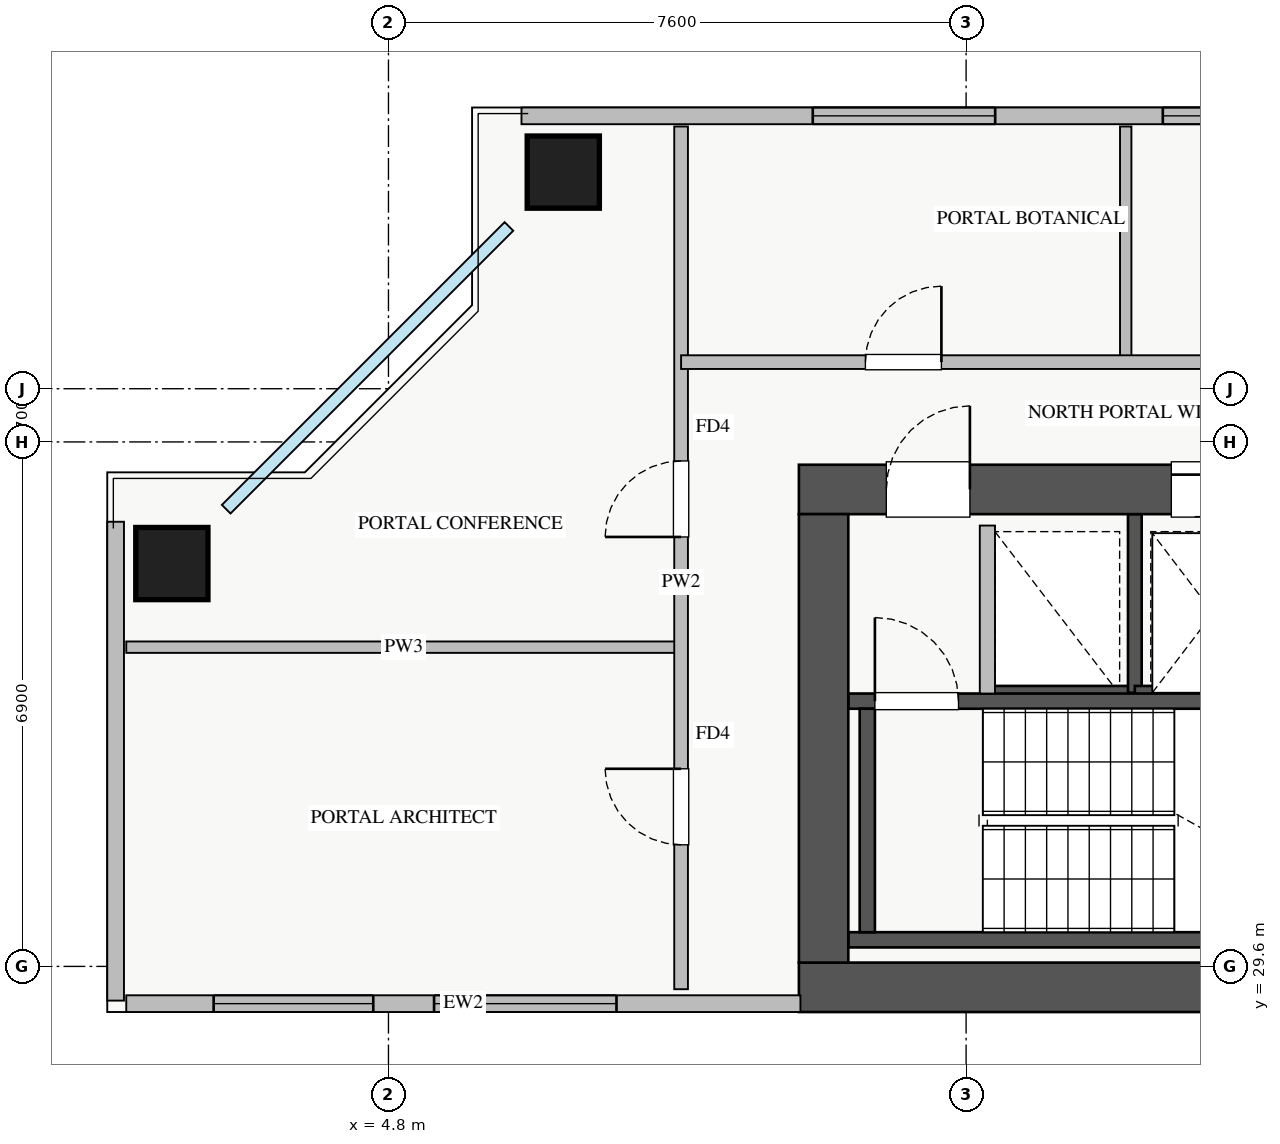
"""IFC4 building model, lengths in metres.
Left out: names, types, materials, properties, quantities, classifications, styles, units other than length and angle.
Written with IfcOpenShell. Run it as: python <this file> out.ifc"""

import sys

from ifc_helpers import new_model, si_unit, direction, frame, frame_2d, origin, origin_2d, place, context, subcontext, project, spatial, rectangle, extrude, source, transform, mapped, element, fill, save


model = new_model("IFC4")
c1 = context("Model", 3, precision=1e-05, world=origin(), true_north=direction((0.0, 1.0)))
c2 = subcontext(c1, "Body", "Model", "MODEL_VIEW")
j1 = project(units=[si_unit("LENGTHUNIT", "METRE"), si_unit("PLANEANGLEUNIT", "RADIAN")], contexts=[c1])
p1 = place(None, origin())
s1 = spatial("IfcSite", under=j1, at=p1, CompositionType="ELEMENT")
p2 = place(p1, origin())
s2 = spatial("IfcBuilding", under=s1, at=p2, CompositionType="ELEMENT")
p3 = place(p2, frame((0.0, 0.0, 169.75)))
s3 = spatial("IfcBuildingStorey", under=s2, at=p3, CompositionType="ELEMENT", Elevation=169.75)
p4 = place(p3, frame((12.68, 33.2, 0.0), z_axis=(0.0, 0.0, 1.0), x_axis=(1.0, 0.0, 0.0)))
e1 = element("IfcWall", 1, at=p4, inside=s3, PredefinedType="SHEAR", context=c2, shape_type="SweptSolid", body=[
    extrude(rectangle(XDim=1.94, YDim=0.18, at=frame_2d((0.97, 0.0))), origin(), (0.0, 0.0, 1.0), 3.0),
])
p5 = place(p3, frame((14.62, 33.2, 0.0), z_axis=(0.0, 0.0, 1.0), x_axis=(0.0, 1.0, 0.0)))
e2 = element("IfcWall", 2, at=p5, inside=s3, PredefinedType="SHEAR", context=c2, shape_type="SweptSolid", body=[
    extrude(rectangle(XDim=2.35, YDim=0.18, at=frame_2d((1.175, 0.0))), origin(), (0.0, 0.0, 1.0), 3.0),
])
p6 = place(p3, frame((14.62, 33.2, 0.0), z_axis=(0.0, 0.0, 1.0), x_axis=(1.0, 0.0, 0.0)))
e3 = element("IfcWall", 3, at=p6, inside=s3, PredefinedType="SHEAR", context=c2, shape_type="SweptSolid", body=[
    extrude(rectangle(XDim=1.96, YDim=0.18, at=frame_2d((0.98, 0.0))), origin(), (0.0, 0.0, 1.0), 3.0),
])
p7 = place(p3, frame((10.85, 29.95, 0.0), z_axis=(0.0, 0.0, 1.0), x_axis=(1.0, 0.0, 0.0)))
e4 = element("IfcWall", 4, at=p7, inside=s3, PredefinedType="SHEAR", context=c2, shape_type="SweptSolid", body=[
    extrude(rectangle(XDim=7.3, YDim=0.2, at=frame_2d((3.65, 0.0))), origin(), (0.0, 0.0, 1.0), 3.25),
])
p8 = place(p3, frame((10.85, 33.09, 0.0), z_axis=(0.0, 0.0, 1.0), x_axis=(1.0, 0.0, 0.0)))
e5 = element("IfcWall", 5, at=p8, inside=s3, PredefinedType="SHEAR", context=c2, shape_type="SweptSolid", body=[
    extrude(rectangle(XDim=7.3, YDim=0.2, at=frame_2d((3.65, 0.0))), origin(), (0.0, 0.0, 1.0), 3.25),
])
p9 = place(p8, frame((0.35, 0.0, 0.0)))
e6 = element("IfcOpeningElement", 6, at=p9, cuts=e5, PredefinedType="OPENING", context=c2, shape_type="SweptSolid", body=[
    extrude(rectangle(XDim=1.1, YDim=2.05, at=frame_2d((0.55, 1.025))), frame((0.0, 0.11, 0.0), z_axis=(0.0, -1.0, 0.0), x_axis=(1.0, 0.0, 0.0)), (0.0, 0.0, 1.0), 0.22),
])
p10 = place(p3, frame((11.1, 30.05, 0.0), z_axis=(0.0, 0.0, 1.0), x_axis=(0.0, 1.0, 0.0)))
e7 = element("IfcWall", 7, at=p10, inside=s3, PredefinedType="SHEAR", context=c2, shape_type="SweptSolid", body=[
    extrude(rectangle(XDim=2.94, YDim=0.2, at=frame_2d((1.47, 0.0))), origin(), (0.0, 0.0, 1.0), 3.25),
])
p11 = place(p3, frame((10.2, 29.325, 0.0), z_axis=(0.0, 0.0, 1.0), x_axis=(1.0, 0.0, 0.0)))
e8 = element("IfcWall", 8, at=p11, inside=s3, PredefinedType="SHEAR", context=c2, shape_type="SweptSolid", body=[
    extrude(rectangle(XDim=17.6, YDim=0.65, at=frame_2d((8.8, 0.0))), origin(), (0.0, 0.0, 1.0), 3.25),
])
p12 = place(p3, frame((10.2, 35.875, 0.0), z_axis=(0.0, 0.0, 1.0), x_axis=(1.0, 0.0, 0.0)))
e9 = element("IfcWall", 9, at=p12, inside=s3, PredefinedType="SHEAR", context=c2, shape_type="SweptSolid", body=[
    extrude(rectangle(XDim=17.6, YDim=0.65, at=frame_2d((8.8, 0.0))), origin(), (0.0, 0.0, 1.0), 3.25),
])
p13 = place(p12, frame((1.15, 0.0, 0.0)))
e10 = element("IfcOpeningElement", 10, at=p13, cuts=e9, PredefinedType="OPENING", context=c2, shape_type="SweptSolid", body=[
    extrude(rectangle(XDim=1.1, YDim=2.05, at=frame_2d((0.55, 1.025))), frame((0.0, 0.335, 0.0), z_axis=(0.0, -1.0, 0.0), x_axis=(1.0, 0.0, 0.0)), (0.0, 0.0, 1.0), 0.67),
])
p14 = place(p12, frame((8.3, 0.0, 0.0)))
e11 = element("IfcOpeningElement", 11, at=p14, cuts=e9, PredefinedType="OPENING", context=c2, shape_type="SweptSolid", body=[
    extrude(rectangle(XDim=1.1, YDim=2.05, at=frame_2d((0.55, 1.025))), frame((0.0, 0.335, 0.0), z_axis=(0.0, -1.0, 0.0), x_axis=(1.0, 0.0, 0.0)), (0.0, 0.0, 1.0), 0.67),
])
p15 = place(p12, frame((4.9, 0.0, 0.0)))
e12 = element("IfcOpeningElement", 12, at=p15, cuts=e9, PredefinedType="OPENING", context=c2, shape_type="SweptSolid", body=[
    extrude(rectangle(XDim=1.1, YDim=2.05, at=frame_2d((0.55, 1.025))), frame((0.0, 0.335, 0.0), z_axis=(0.0, -1.0, 0.0), x_axis=(1.0, 0.0, 0.0)), (0.0, 0.0, 1.0), 0.67),
])
p16 = place(p12, frame((14.74, 0.0, 0.0)))
e13 = element("IfcOpeningElement", 13, at=p16, cuts=e9, PredefinedType="OPENING", context=c2, shape_type="SweptSolid", body=[
    extrude(rectangle(XDim=1.0, YDim=2.05, at=frame_2d((0.5, 1.025))), frame((0.0, 0.335, 0.0), z_axis=(0.0, -1.0, 0.0), x_axis=(1.0, 0.0, 0.0)), (0.0, 0.0, 1.0), 0.67),
])
p17 = place(p12, frame((10.25, 0.0, 0.0)))
e14 = element("IfcOpeningElement", 14, at=p17, cuts=e9, PredefinedType="OPENING", context=c2, shape_type="SweptSolid", body=[
    extrude(rectangle(XDim=1.0, YDim=2.05, at=frame_2d((0.5, 1.025))), frame((0.0, 0.335, 0.0), z_axis=(0.0, -1.0, 0.0), x_axis=(1.0, 0.0, 0.0)), (0.0, 0.0, 1.0), 0.67),
])
p18 = place(p12, frame((12.7, 0.0, 0.0)))
e15 = element("IfcOpeningElement", 15, at=p18, cuts=e9, PredefinedType="OPENING", context=c2, shape_type="SweptSolid", body=[
    extrude(rectangle(XDim=1.0, YDim=2.05, at=frame_2d((0.5, 1.025))), frame((0.0, 0.335, 0.0), z_axis=(0.0, -1.0, 0.0), x_axis=(1.0, 0.0, 0.0)), (0.0, 0.0, 1.0), 0.67),
])
p19 = place(p3, frame((10.525, 29.65, 0.0), z_axis=(0.0, 0.0, 1.0), x_axis=(0.0, 1.0, 0.0)))
e16 = element("IfcWall", 16, at=p19, inside=s3, PredefinedType="SHEAR", context=c2, shape_type="SweptSolid", body=[
    extrude(rectangle(XDim=5.9, YDim=0.65, at=frame_2d((2.95, 0.0))), origin(), (0.0, 0.0, 1.0), 3.25),
])
m1 = source(origin(), c2, "Body", "SweptSolid", [
    extrude(rectangle(XDim=0.95, YDim=0.95, at=origin_2d()), origin(), (0.0, 0.0, 1.0), 3.25),
])
for number, where, z_axis, x_axis in (
    (17, (7.1, 40.05, 0.0), (0.0, 0.0, 1.0), (1.0, 0.0, 0.0)),
    (18, (1.95, 34.9, 0.0), (0.0, 0.0, 1.0), (1.0, 0.0, 0.0)),
):
    element("IfcColumn", number, at=place(p3, frame(where, z_axis=z_axis, x_axis=x_axis)), inside=s3, PredefinedType="COLUMN", context=c2, shape_type="MappedRepresentation", body=[
        mapped(m1, transform((0.0, 0.0, 0.0), x_axis=(1.0, 0.0, 0.0), y_axis=(0.0, 1.0, 0.0), z_axis=(0.0, 0.0, 1.0), scale=1.0)),
    ])
p20 = place(p3, frame((1.35, 29.11, 0.0), z_axis=(0.0, 0.0, 1.0), x_axis=(1.0, 0.0, 0.0)))
e19 = element("IfcWall", 19, at=p20, inside=s3, PredefinedType="STANDARD", context=c2, shape_type="SweptSolid", body=[
    extrude(rectangle(XDim=8.87, YDim=0.22, at=frame_2d((4.435, 0.0))), origin(), (0.0, 0.0, 1.0), 2.54),
])
p21 = place(p20, frame((1.15, 0.0, 0.9)))
e20 = element("IfcOpeningElement", 20, at=p21, cuts=e19, PredefinedType="OPENING", context=c2, shape_type="SweptSolid", body=[
    extrude(rectangle(XDim=2.1, YDim=1.46, at=frame_2d((1.05, 0.73))), frame((0.0, 0.12, 0.0), z_axis=(0.0, -1.0, 0.0), x_axis=(1.0, 0.0, 0.0)), (0.0, 0.0, 1.0), 0.24),
])
p22 = place(p20, frame((4.05, 0.0, 0.9)))
e21 = element("IfcOpeningElement", 21, at=p22, cuts=e19, PredefinedType="OPENING", context=c2, shape_type="SweptSolid", body=[
    extrude(rectangle(XDim=2.4, YDim=1.5, at=frame_2d((1.2, 0.75))), frame((0.0, 0.12, 0.0), z_axis=(0.0, -1.0, 0.0), x_axis=(1.0, 0.0, 0.0)), (0.0, 0.0, 1.0), 0.24),
])
p23 = place(p3, frame((1.21, 29.15, 0.0), z_axis=(0.0, 0.0, 1.0), x_axis=(0.0, 1.0, 0.0)))
e22 = element("IfcWall", 22, at=p23, inside=s3, PredefinedType="STANDARD", context=c2, shape_type="SweptSolid", body=[
    extrude(rectangle(XDim=6.3, YDim=0.22, at=frame_2d((3.15, 0.0))), origin(), (0.0, 0.0, 1.0), 2.54),
])
p24 = place(p3, frame((6.55, 40.79, 0.0), z_axis=(0.0, 0.0, 1.0), x_axis=(1.0, 0.0, 0.0)))
e23 = element("IfcWall", 23, at=p24, inside=s3, PredefinedType="STANDARD", context=c2, shape_type="SweptSolid", body=[
    extrude(rectangle(XDim=24.9, YDim=0.22, at=frame_2d((12.45, 0.0))), origin(), (0.0, 0.0, 1.0), 2.54),
])
p25 = place(p24, frame((3.833, 0.0, 0.9)))
e24 = element("IfcOpeningElement", 24, at=p25, cuts=e23, PredefinedType="OPENING", context=c2, shape_type="SweptSolid", body=[
    extrude(rectangle(XDim=2.4, YDim=1.5, at=frame_2d((1.2, 0.75))), frame((0.0, 0.12, 0.0), z_axis=(0.0, -1.0, 0.0), x_axis=(1.0, 0.0, 0.0)), (0.0, 0.0, 1.0), 0.24),
])
p26 = place(p24, frame((8.438, 0.0, 0.9)))
e25 = element("IfcOpeningElement", 25, at=p26, cuts=e23, PredefinedType="OPENING", context=c2, shape_type="SweptSolid", body=[
    extrude(rectangle(XDim=1.8, YDim=1.45, at=frame_2d((0.9, 0.725))), frame((0.0, 0.12, 0.0), z_axis=(0.0, -1.0, 0.0), x_axis=(1.0, 0.0, 0.0)), (0.0, 0.0, 1.0), 0.24),
])
p27 = place(p24, frame((14.813, 0.0, 0.9)))
e26 = element("IfcOpeningElement", 26, at=p27, cuts=e23, PredefinedType="OPENING", context=c2, shape_type="SweptSolid", body=[
    extrude(rectangle(XDim=1.5, YDim=1.45, at=frame_2d((0.75, 0.725))), frame((0.0, 0.12, 0.0), z_axis=(0.0, -1.0, 0.0), x_axis=(1.0, 0.0, 0.0)), (0.0, 0.0, 1.0), 0.24),
])
p28 = place(p24, frame((20.738, 0.0, 0.9)))
e27 = element("IfcOpeningElement", 27, at=p28, cuts=e23, PredefinedType="OPENING", context=c2, shape_type="SweptSolid", body=[
    extrude(rectangle(XDim=2.1, YDim=1.46, at=frame_2d((1.05, 0.73))), frame((0.0, 0.12, 0.0), z_axis=(0.0, -1.0, 0.0), x_axis=(1.0, 0.0, 0.0)), (0.0, 0.0, 1.0), 0.24),
])
p29 = place(p3, frame((12.68, 33.19, 0.0), z_axis=(0.0, 0.0, 1.0), x_axis=(0.0, 1.0, 0.0)))
e28 = element("IfcWall", 28, at=p29, inside=s3, PredefinedType="PARTITIONING", context=c2, shape_type="SweptSolid", body=[
    extrude(rectangle(XDim=2.21, YDim=0.2, at=frame_2d((1.105, 0.0))), origin(), (0.0, 0.0, 1.0), 3.0),
])
p30 = place(p3, frame((1.35, 33.8, 0.0), z_axis=(0.0, 0.0, 1.0), x_axis=(1.0, 0.0, 0.0)))
e29 = element("IfcWall", 29, at=p30, inside=s3, PredefinedType="PARTITIONING", context=c2, shape_type="SweptSolid", body=[
    extrude(rectangle(XDim=7.3, YDim=0.15, at=frame_2d((3.65, 0.0))), origin(), (0.0, 0.0, 1.0), 3.0),
])
p31 = place(p3, frame((8.65, 29.3, 0.0), z_axis=(0.0, 0.0, 1.0), x_axis=(0.0, 1.0, 0.0)))
e30 = element("IfcWall", 30, at=p31, inside=s3, PredefinedType="PARTITIONING", context=c2, shape_type="SweptSolid", body=[
    extrude(rectangle(XDim=11.35, YDim=0.18, at=frame_2d((5.675, 0.0))), origin(), (0.0, 0.0, 1.0), 3.0),
])
p32 = place(p31, frame((1.9, 0.0, 0.0)))
e31 = element("IfcOpeningElement", 31, at=p32, cuts=e30, PredefinedType="OPENING", context=c2, shape_type="SweptSolid", body=[
    extrude(rectangle(XDim=1.0, YDim=2.05, at=frame_2d((0.5, 1.025))), frame((0.0, 0.1, 0.0), z_axis=(0.0, -1.0, 0.0), x_axis=(1.0, 0.0, 0.0)), (0.0, 0.0, 1.0), 0.2),
])
p33 = place(p31, frame((5.95, 0.0, 0.0)))
e32 = element("IfcOpeningElement", 32, at=p33, cuts=e30, PredefinedType="OPENING", context=c2, shape_type="SweptSolid", body=[
    extrude(rectangle(XDim=1.0, YDim=2.05, at=frame_2d((0.5, 1.025))), frame((0.0, 0.1, 0.0), z_axis=(0.0, -1.0, 0.0), x_axis=(1.0, 0.0, 0.0)), (0.0, 0.0, 1.0), 0.2),
])
p34 = place(p3, frame((14.5, 37.55, 0.0), z_axis=(0.0, 0.0, 1.0), x_axis=(0.0, 1.0, 0.0)))
e33 = element("IfcWall", 33, at=p34, inside=s3, PredefinedType="PARTITIONING", context=c2, shape_type="SweptSolid", body=[
    extrude(rectangle(XDim=3.1, YDim=0.15, at=frame_2d((1.55, 0.0))), origin(), (0.0, 0.0, 1.0), 3.0),
])
p35 = place(p3, frame((8.65, 37.55, 0.0), z_axis=(0.0, 0.0, 1.0), x_axis=(1.0, 0.0, 0.0)))
e34 = element("IfcWall", 34, at=p35, inside=s3, PredefinedType="PARTITIONING", context=c2, shape_type="SweptSolid", body=[
    extrude(rectangle(XDim=23.8, YDim=0.18, at=frame_2d((11.9, 0.0))), origin(), (0.0, 0.0, 1.0), 3.0),
])
p36 = place(p35, frame((2.425, 0.0, 0.0)))
e35 = element("IfcOpeningElement", 35, at=p36, cuts=e34, PredefinedType="OPENING", context=c2, shape_type="SweptSolid", body=[
    extrude(rectangle(XDim=1.0, YDim=2.05, at=frame_2d((0.5, 1.025))), frame((0.0, 0.1, 0.0), z_axis=(0.0, -1.0, 0.0), x_axis=(1.0, 0.0, 0.0)), (0.0, 0.0, 1.0), 0.2),
])
p37 = place(p35, frame((8.35, 0.0, 0.0)))
e36 = element("IfcOpeningElement", 36, at=p37, cuts=e34, PredefinedType="OPENING", context=c2, shape_type="SweptSolid", body=[
    extrude(rectangle(XDim=1.0, YDim=2.05, at=frame_2d((0.5, 1.025))), frame((0.0, 0.1, 0.0), z_axis=(0.0, -1.0, 0.0), x_axis=(1.0, 0.0, 0.0)), (0.0, 0.0, 1.0), 0.2),
])
p38 = place(p35, frame((14.35, 0.0, 0.0)))
e37 = element("IfcOpeningElement", 37, at=p38, cuts=e34, PredefinedType="OPENING", context=c2, shape_type="SweptSolid", body=[
    extrude(rectangle(XDim=1.0, YDim=2.05, at=frame_2d((0.5, 1.025))), frame((0.0, 0.1, 0.0), z_axis=(0.0, -1.0, 0.0), x_axis=(1.0, 0.0, 0.0)), (0.0, 0.0, 1.0), 0.2),
])
p39 = place(p35, frame((20.325, 0.0, 0.0)))
e38 = element("IfcOpeningElement", 38, at=p39, cuts=e34, PredefinedType="OPENING", context=c2, shape_type="SweptSolid", body=[
    extrude(rectangle(XDim=1.0, YDim=2.05, at=frame_2d((0.5, 1.025))), frame((0.0, 0.1, 0.0), z_axis=(0.0, -1.0, 0.0), x_axis=(1.0, 0.0, 0.0)), (0.0, 0.0, 1.0), 0.2),
])
m2 = source(origin(), c2, "Body", "SweptSolid", [
    extrude(rectangle(XDim=2.1, YDim=1.46, at=frame_2d((1.05, 0.73))), frame((0.0, 0.03, 0.0), z_axis=(0.0, -1.0, 0.0), x_axis=(1.0, 0.0, 0.0)), (0.0, 0.0, 1.0), 0.06),
])
p40 = place(p21, origin())
e39 = element("IfcWindow", 39, at=p40, inside=s3, PartitioningType="TRIPLE_PANEL_VERTICAL", PredefinedType="WINDOW", context=c2, shape_type="MappedRepresentation", body=[
    mapped(m2, transform((0.0, 0.0, 0.0), x_axis=(1.0, 0.0, 0.0), y_axis=(0.0, 1.0, 0.0), z_axis=(0.0, 0.0, 1.0), scale=1.0)),
])
fill(e20, e39)
m3 = source(origin(), c2, "Body", "SweptSolid", [
    extrude(rectangle(XDim=2.4, YDim=1.5, at=frame_2d((1.2, 0.75))), frame((0.0, 0.03, 0.0), z_axis=(0.0, -1.0, 0.0), x_axis=(1.0, 0.0, 0.0)), (0.0, 0.0, 1.0), 0.06),
])
p41 = place(p22, origin())
e40 = element("IfcWindow", 40, at=p41, inside=s3, PartitioningType="TRIPLE_PANEL_VERTICAL", PredefinedType="WINDOW", context=c2, shape_type="MappedRepresentation", body=[
    mapped(m3, transform((0.0, 0.0, 0.0), x_axis=(1.0, 0.0, 0.0), y_axis=(0.0, 1.0, 0.0), z_axis=(0.0, 0.0, 1.0), scale=1.0)),
])
fill(e21, e40)
p42 = place(p25, origin())
e41 = element("IfcWindow", 41, at=p42, inside=s3, PartitioningType="TRIPLE_PANEL_VERTICAL", PredefinedType="WINDOW", context=c2, shape_type="MappedRepresentation", body=[
    mapped(m3, transform((0.0, 0.0, 0.0), x_axis=(1.0, 0.0, 0.0), y_axis=(0.0, 1.0, 0.0), z_axis=(0.0, 0.0, 1.0), scale=1.0)),
])
fill(e24, e41)
m4 = source(origin(), c2, "Body", "SweptSolid", [
    extrude(rectangle(XDim=1.8, YDim=1.45, at=frame_2d((0.9, 0.725))), frame((0.0, 0.03, 0.0), z_axis=(0.0, -1.0, 0.0), x_axis=(1.0, 0.0, 0.0)), (0.0, 0.0, 1.0), 0.06),
])
p43 = place(p26, origin())
e42 = element("IfcWindow", 42, at=p43, inside=s3, PartitioningType="DOUBLE_PANEL_VERTICAL", PredefinedType="WINDOW", context=c2, shape_type="MappedRepresentation", body=[
    mapped(m4, transform((0.0, 0.0, 0.0), x_axis=(1.0, 0.0, 0.0), y_axis=(0.0, 1.0, 0.0), z_axis=(0.0, 0.0, 1.0), scale=1.0)),
])
fill(e25, e42)
m5 = source(origin(), c2, "Body", "SweptSolid", [
    extrude(rectangle(XDim=1.1, YDim=2.05, at=frame_2d((0.55, 1.025))), frame((0.0, 0.025, 0.0), z_axis=(0.0, -1.0, 0.0), x_axis=(1.0, 0.0, 0.0)), (0.0, 0.0, 1.0), 0.05),
])
p44 = place(p13, origin())
e43 = element("IfcDoor", 43, at=p44, inside=s3, OperationType="SINGLE_SWING_RIGHT", PredefinedType="DOOR", context=c2, shape_type="MappedRepresentation", body=[
    mapped(m5, transform((0.0, 0.0, 0.0), x_axis=(1.0, 0.0, 0.0), y_axis=(0.0, 1.0, 0.0), z_axis=(0.0, 0.0, 1.0), scale=1.0)),
])
fill(e10, e43)
p45 = place(p9, origin())
e44 = element("IfcDoor", 44, at=p45, inside=s3, OperationType="SINGLE_SWING_LEFT", PredefinedType="DOOR", context=c2, shape_type="MappedRepresentation", body=[
    mapped(m5, transform((0.0, 0.0, 0.0), x_axis=(1.0, 0.0, 0.0), y_axis=(0.0, 1.0, 0.0), z_axis=(0.0, 0.0, 1.0), scale=1.0)),
])
fill(e6, e44)
p46 = place(p15, origin())
e45 = element("IfcDoor", 45, at=p46, inside=s3, OperationType="SLIDING_TO_LEFT", PredefinedType="DOOR", context=c2, shape_type="MappedRepresentation", body=[
    mapped(m5, transform((0.0, 0.0, 0.0), x_axis=(1.0, 0.0, 0.0), y_axis=(0.0, 1.0, 0.0), z_axis=(0.0, 0.0, 1.0), scale=1.0)),
])
fill(e12, e45)
m6 = source(origin(), c2, "Body", "SweptSolid", [
    extrude(rectangle(XDim=1.0, YDim=2.05, at=frame_2d((0.5, 1.025))), frame((0.0, 0.025, 0.0), z_axis=(0.0, -1.0, 0.0), x_axis=(1.0, 0.0, 0.0)), (0.0, 0.0, 1.0), 0.05),
])
p47 = place(p32, origin())
e46 = element("IfcDoor", 46, at=p47, inside=s3, OperationType="SINGLE_SWING_RIGHT", PredefinedType="DOOR", context=c2, shape_type="MappedRepresentation", body=[
    mapped(m6, transform((0.0, 0.0, 0.0), x_axis=(1.0, 0.0, 0.0), y_axis=(0.0, 1.0, 0.0), z_axis=(0.0, 0.0, 1.0), scale=1.0)),
])
fill(e31, e46)
p48 = place(p33, origin())
e47 = element("IfcDoor", 47, at=p48, inside=s3, OperationType="SINGLE_SWING_LEFT", PredefinedType="DOOR", context=c2, shape_type="MappedRepresentation", body=[
    mapped(m6, transform((0.0, 0.0, 0.0), x_axis=(1.0, 0.0, 0.0), y_axis=(0.0, 1.0, 0.0), z_axis=(0.0, 0.0, 1.0), scale=1.0)),
])
fill(e32, e47)
p49 = place(p36, origin())
e48 = element("IfcDoor", 48, at=p49, inside=s3, OperationType="SINGLE_SWING_RIGHT", PredefinedType="DOOR", context=c2, shape_type="MappedRepresentation", body=[
    mapped(m6, transform((0.0, 0.0, 0.0), x_axis=(1.0, 0.0, 0.0), y_axis=(0.0, 1.0, 0.0), z_axis=(0.0, 0.0, 1.0), scale=1.0)),
])
fill(e35, e48)
save(model, sys.argv[1])
